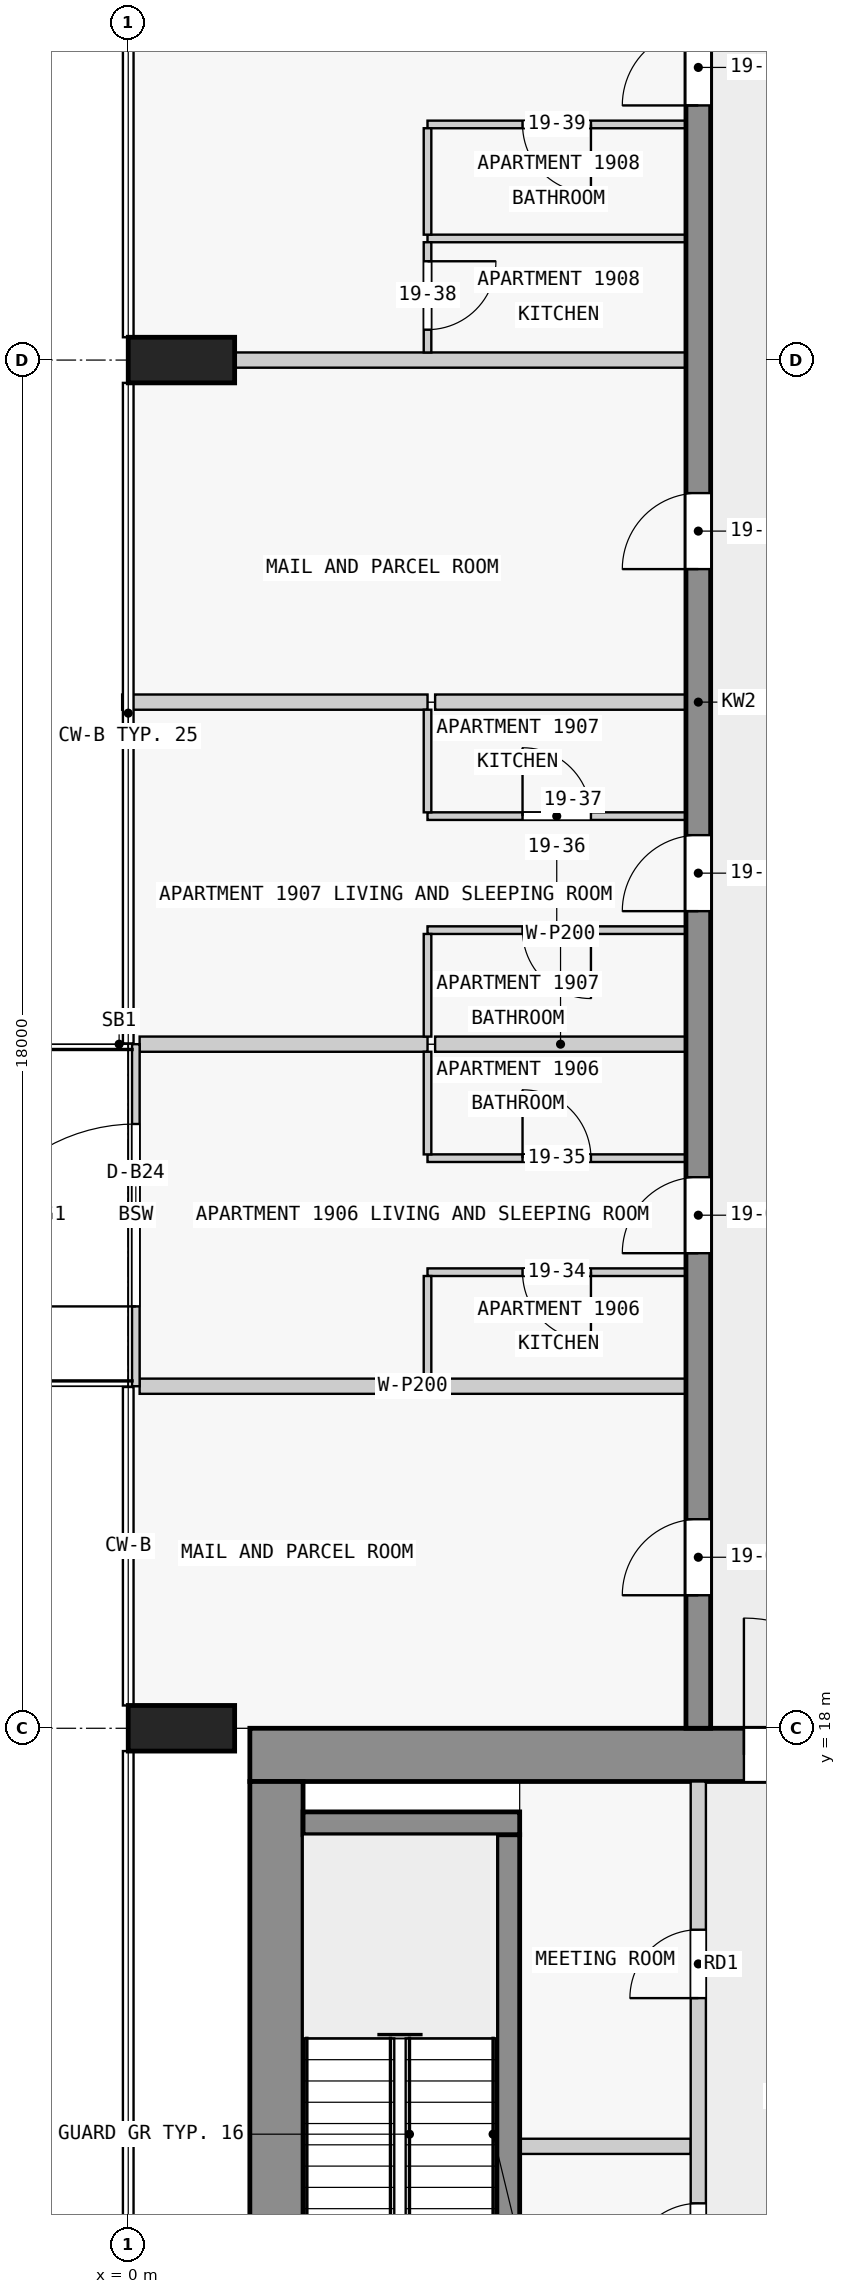
"""IFC4 building model, lengths in metres.
Left out: names, types, materials, properties, quantities, classifications, styles, units other than length and angle.
Written with IfcOpenShell. Run it as: python <this file> out.ifc"""

import sys

from ifc_helpers import new_model, si_unit, direction, frame, frame_2d, origin, origin_2d, place, context, subcontext, project, spatial, rectangle, extrude, element, fill, save


model = new_model("IFC4")
c1 = context("Model", 3, precision=1e-05, world=origin(), true_north=direction((0.0, 1.0)))
c2 = subcontext(c1, "Body", "Model", "MODEL_VIEW")
j1 = project(units=[si_unit("LENGTHUNIT", "METRE"), si_unit("PLANEANGLEUNIT", "RADIAN")], contexts=[c1])
p1 = place(None, origin())
s1 = spatial("IfcSite", under=j1, at=p1, CompositionType="ELEMENT")
p2 = place(p1, origin())
s2 = spatial("IfcBuilding", under=s1, at=p2, CompositionType="ELEMENT")
p3 = place(p2, frame((0.0, 0.0, 78.3)))
s3 = spatial("IfcBuildingStorey", under=s2, at=p3, CompositionType="ELEMENT", Elevation=78.3)
for number, where, z_axis, x_axis in (
    (1, (0.7, 36.0, 0.0), (0.0, 0.0, 1.0), (0.0, 1.0, 0.0)),
    (2, (0.7, 18.0, 0.0), (0.0, 0.0, 1.0), (0.0, 1.0, 0.0)),
):
    element("IfcColumn", number, at=place(p3, frame(where, z_axis=z_axis, x_axis=x_axis)), inside=s3, PredefinedType="COLUMN", context=c2, shape_type="SweptSolid", body=[
        extrude(rectangle(XDim=0.6, YDim=1.4, at=origin_2d()), origin(), (0.0, 0.0, 1.0), 3.5),
    ])
p4 = place(p3, frame((1.6, 17.65, 0.0), z_axis=(0.0, 0.0, 1.0), x_axis=(1.0, 0.0, 0.0)))
e3 = element("IfcWall", 3, at=p4, inside=s3, PredefinedType="SHEAR", context=c2, shape_type="SweptSolid", body=[
    extrude(rectangle(XDim=20.9, YDim=0.7, at=frame_2d((10.45, 0.0))), origin(), (0.0, 0.0, 1.0), 3.25),
])
p5 = place(p4, frame((6.5, 0.0, 0.0)))
e4 = element("IfcOpeningElement", 4, at=p5, cuts=e3, PredefinedType="OPENING", context=c2, shape_type="SweptSolid", body=[
    extrude(rectangle(XDim=1.8, YDim=2.1, at=frame_2d((0.9, 1.05))), frame((0.0, 0.36, 0.0), z_axis=(0.0, -1.0, 0.0), x_axis=(1.0, 0.0, 0.0)), (0.0, 0.0, 1.0), 0.72),
])
p6 = place(p3, frame((1.95, 2.5, 0.0), z_axis=(0.0, 0.0, 1.0), x_axis=(0.0, 1.0, 0.0)))
e5 = element("IfcWall", 5, at=p6, inside=s3, PredefinedType="SHEAR", context=c2, shape_type="SweptSolid", body=[
    extrude(rectangle(XDim=14.8, YDim=0.7, at=frame_2d((7.4, 0.0))), origin(), (0.0, 0.0, 1.0), 3.25),
])
p7 = place(p3, frame((5.0, 10.2, 0.0), z_axis=(0.0, 0.0, 1.0), x_axis=(0.0, 1.0, 0.0)))
e6 = element("IfcWall", 6, at=p7, inside=s3, PredefinedType="SHEAR", context=c2, shape_type="SweptSolid", body=[
    extrude(rectangle(XDim=6.4, YDim=0.3, at=frame_2d((3.2, 0.0))), origin(), (0.0, 0.0, 1.0), 3.25),
])
p8 = place(p3, frame((2.3, 16.75, 0.0), z_axis=(0.0, 0.0, 1.0), x_axis=(1.0, 0.0, 0.0)))
e7 = element("IfcWall", 7, at=p8, inside=s3, PredefinedType="SHEAR", context=c2, shape_type="SweptSolid", body=[
    extrude(rectangle(XDim=2.85, YDim=0.3, at=frame_2d((1.425, 0.0))), origin(), (0.0, 0.0, 1.0), 3.25),
])
p9 = place(p3, frame((7.5, 18.0, 0.0), z_axis=(0.0, 0.0, 1.0), x_axis=(0.0, 1.0, 0.0)))
e8 = element("IfcWall", 8, at=p9, inside=s3, PredefinedType="SHEAR", context=c2, shape_type="SweptSolid", body=[
    extrude(rectangle(XDim=27.0, YDim=0.325, at=frame_2d((13.5, 0.0))), origin(), (0.0, 0.0, 1.0), 3.25),
])
p10 = place(p9, frame((1.75, 0.0, 0.0)))
e9 = element("IfcOpeningElement", 9, at=p10, cuts=e8, PredefinedType="OPENING", context=c2, shape_type="SweptSolid", body=[
    extrude(rectangle(XDim=1.0, YDim=2.1, at=frame_2d((0.5, 1.05))), frame((0.0, 0.172, 0.0), z_axis=(0.0, -1.0, 0.0), x_axis=(1.0, 0.0, 0.0)), (0.0, 0.0, 1.0), 0.345),
])
p11 = place(p9, frame((6.25, 0.0, 0.0)))
e10 = element("IfcOpeningElement", 10, at=p11, cuts=e8, PredefinedType="OPENING", context=c2, shape_type="SweptSolid", body=[
    extrude(rectangle(XDim=1.0, YDim=2.1, at=frame_2d((0.5, 1.05))), frame((0.0, 0.172, 0.0), z_axis=(0.0, -1.0, 0.0), x_axis=(1.0, 0.0, 0.0)), (0.0, 0.0, 1.0), 0.345),
])
p12 = place(p9, frame((10.75, 0.0, 0.0)))
e11 = element("IfcOpeningElement", 11, at=p12, cuts=e8, PredefinedType="OPENING", context=c2, shape_type="SweptSolid", body=[
    extrude(rectangle(XDim=1.0, YDim=2.1, at=frame_2d((0.5, 1.05))), frame((0.0, 0.172, 0.0), z_axis=(0.0, -1.0, 0.0), x_axis=(1.0, 0.0, 0.0)), (0.0, 0.0, 1.0), 0.345),
])
p13 = place(p9, frame((15.25, 0.0, 0.0)))
e12 = element("IfcOpeningElement", 12, at=p13, cuts=e8, PredefinedType="OPENING", context=c2, shape_type="SweptSolid", body=[
    extrude(rectangle(XDim=1.0, YDim=2.1, at=frame_2d((0.5, 1.05))), frame((0.0, 0.172, 0.0), z_axis=(0.0, -1.0, 0.0), x_axis=(1.0, 0.0, 0.0)), (0.0, 0.0, 1.0), 0.345),
])
p14 = place(p9, frame((21.35, 0.0, 0.0)))
e13 = element("IfcOpeningElement", 13, at=p14, cuts=e8, PredefinedType="OPENING", context=c2, shape_type="SweptSolid", body=[
    extrude(rectangle(XDim=1.0, YDim=2.1, at=frame_2d((0.5, 1.05))), frame((0.0, 0.172, 0.0), z_axis=(0.0, -1.0, 0.0), x_axis=(1.0, 0.0, 0.0)), (0.0, 0.0, 1.0), 0.345),
])
p15 = place(p3, frame((0.1, 22.5, 0.0), z_axis=(0.0, 0.0, 1.0), x_axis=(0.0, 1.0, 0.0)))
e14 = element("IfcWall", 14, at=p15, inside=s3, PredefinedType="STANDARD", context=c2, shape_type="SweptSolid", body=[
    extrude(rectangle(XDim=4.5, YDim=0.1, at=frame_2d((2.25, 0.0))), origin(), (0.0, 0.0, 1.0), 3.25),
])
p16 = place(p15, frame((1.05, 0.0, 0.0)))
e15 = element("IfcOpeningElement", 15, at=p16, cuts=e14, PredefinedType="OPENING", context=c2, shape_type="SweptSolid", body=[
    extrude(rectangle(XDim=2.4, YDim=2.4, at=frame_2d((1.2, 1.2))), frame((0.0, 0.06, 0.0), z_axis=(0.0, -1.0, 0.0), x_axis=(1.0, 0.0, 0.0)), (0.0, 0.0, 1.0), 0.12),
])
p17 = place(p3, frame((7.5, 10.1, 0.0), z_axis=(0.0, 0.0, 1.0), x_axis=(0.0, 1.0, 0.0)))
e16 = element("IfcWall", 16, at=p17, inside=s3, PredefinedType="PARTITIONING", context=c2, shape_type="SweptSolid", body=[
    extrude(rectangle(XDim=7.2, YDim=0.2, at=frame_2d((3.6, 0.0))), origin(), (0.0, 0.0, 1.0), 3.25),
])
p18 = place(p17, frame((0.75, 0.0, 0.0)))
e17 = element("IfcOpeningElement", 17, at=p18, cuts=e16, PredefinedType="OPENING", context=c2, shape_type="SweptSolid", body=[
    extrude(rectangle(XDim=0.9, YDim=2.1, at=frame_2d((0.45, 1.05))), frame((0.0, 0.11, 0.0), z_axis=(0.0, -1.0, 0.0), x_axis=(1.0, 0.0, 0.0)), (0.0, 0.0, 1.0), 0.22),
])
p19 = place(p17, frame((4.35, 0.0, 0.0)))
e18 = element("IfcOpeningElement", 18, at=p19, cuts=e16, PredefinedType="OPENING", context=c2, shape_type="SweptSolid", body=[
    extrude(rectangle(XDim=0.9, YDim=2.1, at=frame_2d((0.45, 1.05))), frame((0.0, 0.11, 0.0), z_axis=(0.0, -1.0, 0.0), x_axis=(1.0, 0.0, 0.0)), (0.0, 0.0, 1.0), 0.22),
])
p20 = place(p3, frame((5.15, 12.5, 0.0), z_axis=(0.0, 0.0, 1.0), x_axis=(1.0, 0.0, 0.0)))
e19 = element("IfcWall", 19, at=p20, inside=s3, PredefinedType="PARTITIONING", context=c2, shape_type="SweptSolid", body=[
    extrude(rectangle(XDim=2.25, YDim=0.2, at=frame_2d((1.125, 0.0))), origin(), (0.0, 0.0, 1.0), 3.25),
])
p21 = place(p3, frame((7.337, 22.5, 0.0), z_axis=(0.0, 0.0, 1.0), x_axis=(-1.0, 0.0, 0.0)))
e20 = element("IfcWall", 20, at=p21, inside=s3, PredefinedType="PARTITIONING", context=c2, shape_type="SweptSolid", body=[
    extrude(rectangle(XDim=7.188, YDim=0.2, at=frame_2d((3.594, 0.0))), origin(), (0.0, 0.0, 1.0), 3.25),
])
p22 = place(p3, frame((7.337, 24.0, 0.0), z_axis=(0.0, 0.0, 1.0), x_axis=(-1.0, 0.0, 0.0)))
e21 = element("IfcWall", 21, at=p22, inside=s3, PredefinedType="PARTITIONING", context=c2, shape_type="SweptSolid", body=[
    extrude(rectangle(XDim=3.4, YDim=0.1, at=frame_2d((1.7, 0.0))), origin(), (0.0, 0.0, 1.0), 3.25),
])
p23 = place(p22, frame((1.25, 0.0, 0.0)))
e22 = element("IfcOpeningElement", 22, at=p23, cuts=e21, PredefinedType="OPENING", context=c2, shape_type="SweptSolid", body=[
    extrude(rectangle(XDim=0.9, YDim=2.1, at=frame_2d((0.45, 1.05))), frame((0.0, 0.06, 0.0), z_axis=(0.0, -1.0, 0.0), x_axis=(1.0, 0.0, 0.0)), (0.0, 0.0, 1.0), 0.12),
])
p24 = place(p3, frame((3.938, 25.5, 0.0), z_axis=(0.0, 0.0, 1.0), x_axis=(1.0, 0.0, 0.0)))
e23 = element("IfcWall", 23, at=p24, inside=s3, PredefinedType="PARTITIONING", context=c2, shape_type="SweptSolid", body=[
    extrude(rectangle(XDim=3.4, YDim=0.1, at=frame_2d((1.7, 0.0))), origin(), (0.0, 0.0, 1.0), 3.25),
])
p25 = place(p24, frame((1.25, 0.0, 0.0)))
e24 = element("IfcOpeningElement", 24, at=p25, cuts=e23, PredefinedType="OPENING", context=c2, shape_type="SweptSolid", body=[
    extrude(rectangle(XDim=0.9, YDim=2.1, at=frame_2d((0.45, 1.05))), frame((0.0, 0.06, 0.0), z_axis=(0.0, -1.0, 0.0), x_axis=(1.0, 0.0, 0.0)), (0.0, 0.0, 1.0), 0.12),
])
p26 = place(p3, frame((7.337, 27.0, 0.0), z_axis=(0.0, 0.0, 1.0), x_axis=(-1.0, 0.0, 0.0)))
e25 = element("IfcWall", 25, at=p26, inside=s3, PredefinedType="PARTITIONING", context=c2, shape_type="SweptSolid", body=[
    extrude(rectangle(XDim=3.3, YDim=0.2, at=frame_2d((1.65, 0.0))), origin(), (0.0, 0.0, 1.0), 3.25),
])
p27 = place(p3, frame((0.15, 27.0, 0.0), z_axis=(0.0, 0.0, 1.0), x_axis=(1.0, 0.0, 0.0)))
e26 = element("IfcWall", 26, at=p27, inside=s3, PredefinedType="PARTITIONING", context=c2, shape_type="SweptSolid", body=[
    extrude(rectangle(XDim=3.788, YDim=0.2, at=frame_2d((1.894, 0.0))), origin(), (0.0, 0.0, 1.0), 3.25),
])
p28 = place(p3, frame((7.337, 28.5, 0.0), z_axis=(0.0, 0.0, 1.0), x_axis=(-1.0, 0.0, 0.0)))
e27 = element("IfcWall", 27, at=p28, inside=s3, PredefinedType="PARTITIONING", context=c2, shape_type="SweptSolid", body=[
    extrude(rectangle(XDim=3.4, YDim=0.1, at=frame_2d((1.7, 0.0))), origin(), (0.0, 0.0, 1.0), 3.25),
])
p29 = place(p28, frame((1.25, 0.0, 0.0)))
e28 = element("IfcOpeningElement", 28, at=p29, cuts=e27, PredefinedType="OPENING", context=c2, shape_type="SweptSolid", body=[
    extrude(rectangle(XDim=0.9, YDim=2.1, at=frame_2d((0.45, 1.05))), frame((0.0, 0.06, 0.0), z_axis=(0.0, -1.0, 0.0), x_axis=(1.0, 0.0, 0.0)), (0.0, 0.0, 1.0), 0.12),
])
p30 = place(p3, frame((3.938, 30.0, 0.0), z_axis=(0.0, 0.0, 1.0), x_axis=(1.0, 0.0, 0.0)))
e29 = element("IfcWall", 29, at=p30, inside=s3, PredefinedType="PARTITIONING", context=c2, shape_type="SweptSolid", body=[
    extrude(rectangle(XDim=3.4, YDim=0.1, at=frame_2d((1.7, 0.0))), origin(), (0.0, 0.0, 1.0), 3.25),
])
p31 = place(p30, frame((1.25, 0.0, 0.0)))
e30 = element("IfcOpeningElement", 30, at=p31, cuts=e29, PredefinedType="OPENING", context=c2, shape_type="SweptSolid", body=[
    extrude(rectangle(XDim=0.9, YDim=2.1, at=frame_2d((0.45, 1.05))), frame((0.0, 0.06, 0.0), z_axis=(0.0, -1.0, 0.0), x_axis=(1.0, 0.0, 0.0)), (0.0, 0.0, 1.0), 0.12),
])
p32 = place(p3, frame((7.337, 31.5, 0.0), z_axis=(0.0, 0.0, 1.0), x_axis=(-1.0, 0.0, 0.0)))
e31 = element("IfcWall", 31, at=p32, inside=s3, PredefinedType="PARTITIONING", context=c2, shape_type="SweptSolid", body=[
    extrude(rectangle(XDim=3.3, YDim=0.2, at=frame_2d((1.65, 0.0))), origin(), (0.0, 0.0, 1.0), 3.25),
])
p33 = place(p3, frame((-0.08, 31.5, 0.0), z_axis=(0.0, 0.0, 1.0), x_axis=(1.0, 0.0, 0.0)))
e32 = element("IfcWall", 32, at=p33, inside=s3, PredefinedType="PARTITIONING", context=c2, shape_type="SweptSolid", body=[
    extrude(rectangle(XDim=4.018, YDim=0.2, at=frame_2d((2.009, 0.0))), origin(), (0.0, 0.0, 1.0), 3.25),
])
p34 = place(p3, frame((7.337, 36.0, 0.0), z_axis=(0.0, 0.0, 1.0), x_axis=(-1.0, 0.0, 0.0)))
e33 = element("IfcWall", 33, at=p34, inside=s3, PredefinedType="PARTITIONING", context=c2, shape_type="SweptSolid", body=[
    extrude(rectangle(XDim=5.938, YDim=0.2, at=frame_2d((2.969, 0.0))), origin(), (0.0, 0.0, 1.0), 3.25),
])
p35 = place(p3, frame((7.337, 37.6, 0.0), z_axis=(0.0, 0.0, 1.0), x_axis=(-1.0, 0.0, 0.0)))
e34 = element("IfcWall", 34, at=p35, inside=s3, PredefinedType="PARTITIONING", context=c2, shape_type="SweptSolid", body=[
    extrude(rectangle(XDim=3.4, YDim=0.1, at=frame_2d((1.7, 0.0))), origin(), (0.0, 0.0, 1.0), 3.25),
])
p36 = place(p3, frame((7.337, 39.1, 0.0), z_axis=(0.0, 0.0, 1.0), x_axis=(-1.0, 0.0, 0.0)))
e35 = element("IfcWall", 35, at=p36, inside=s3, PredefinedType="PARTITIONING", context=c2, shape_type="SweptSolid", body=[
    extrude(rectangle(XDim=3.4, YDim=0.1, at=frame_2d((1.7, 0.0))), origin(), (0.0, 0.0, 1.0), 3.25),
])
p37 = place(p36, frame((1.25, 0.0, 0.0)))
e36 = element("IfcOpeningElement", 36, at=p37, cuts=e35, PredefinedType="OPENING", context=c2, shape_type="SweptSolid", body=[
    extrude(rectangle(XDim=0.9, YDim=2.1, at=frame_2d((0.45, 1.05))), frame((0.0, 0.06, 0.0), z_axis=(0.0, -1.0, 0.0), x_axis=(1.0, 0.0, 0.0)), (0.0, 0.0, 1.0), 0.12),
])
for number, where, z_axis, x_axis in (
    (37, (3.938, 23.95, 0.0), (0.0, 0.0, 1.0), (0.0, -1.0, 0.0)),
    (38, (3.938, 26.9, 0.0), (0.0, 0.0, 1.0), (0.0, -1.0, 0.0)),
    (39, (3.938, 28.45, 0.0), (0.0, 0.0, 1.0), (0.0, -1.0, 0.0)),
    (40, (3.938, 31.4, 0.0), (0.0, 0.0, 1.0), (0.0, -1.0, 0.0)),
):
    element("IfcWall", number, at=place(p3, frame(where, z_axis=z_axis, x_axis=x_axis)), inside=s3, PredefinedType="PARTITIONING", context=c2, shape_type="SweptSolid", body=[
        extrude(rectangle(XDim=1.35, YDim=0.1, at=frame_2d((0.675, 0.0))), origin(), (0.0, 0.0, 1.0), 3.25),
    ])
p38 = place(p3, frame((3.938, 37.55, 0.0), z_axis=(0.0, 0.0, 1.0), x_axis=(0.0, -1.0, 0.0)))
e41 = element("IfcWall", 41, at=p38, inside=s3, PredefinedType="PARTITIONING", context=c2, shape_type="SweptSolid", body=[
    extrude(rectangle(XDim=1.45, YDim=0.1, at=frame_2d((0.725, 0.0))), origin(), (0.0, 0.0, 1.0), 3.25),
])
p39 = place(p38, frame((0.25, 0.0, 0.0)))
e42 = element("IfcOpeningElement", 42, at=p39, cuts=e41, PredefinedType="OPENING", context=c2, shape_type="SweptSolid", body=[
    extrude(rectangle(XDim=0.9, YDim=2.1, at=frame_2d((0.45, 1.05))), frame((0.0, 0.06, 0.0), z_axis=(0.0, -1.0, 0.0), x_axis=(1.0, 0.0, 0.0)), (0.0, 0.0, 1.0), 0.12),
])
p40 = place(p3, frame((3.938, 39.05, 0.0), z_axis=(0.0, 0.0, 1.0), x_axis=(0.0, -1.0, 0.0)))
e43 = element("IfcWall", 43, at=p40, inside=s3, PredefinedType="PARTITIONING", context=c2, shape_type="SweptSolid", body=[
    extrude(rectangle(XDim=1.4, YDim=0.1, at=frame_2d((0.7, 0.0))), origin(), (0.0, 0.0, 1.0), 3.25),
])
p41 = place(p16, origin())
e44 = element("IfcDoor", 44, at=p41, inside=s3, OperationType="SINGLE_SWING_LEFT", PredefinedType="DOOR", context=c2, shape_type="SweptSolid", body=[
    extrude(rectangle(XDim=2.4, YDim=2.4, at=frame_2d((1.2, 1.2))), frame((0.0, 0.025, 0.0), z_axis=(0.0, -1.0, 0.0), x_axis=(1.0, 0.0, 0.0)), (0.0, 0.0, 1.0), 0.05),
])
fill(e15, e44)
p42 = place(p5, origin())
e45 = element("IfcDoor", 45, at=p42, inside=s3, OperationType="DOUBLE_DOOR_SINGLE_SWING", PredefinedType="DOOR", context=c2, shape_type="SweptSolid", body=[
    extrude(rectangle(XDim=1.8, YDim=2.1, at=frame_2d((0.9, 1.05))), frame((0.0, 0.025, 0.0), z_axis=(0.0, -1.0, 0.0), x_axis=(1.0, 0.0, 0.0)), (0.0, 0.0, 1.0), 0.05),
])
fill(e4, e45)
p43 = place(p18, origin())
e46 = element("IfcDoor", 46, at=p43, inside=s3, OperationType="SINGLE_SWING_RIGHT", PredefinedType="DOOR", context=c2, shape_type="SweptSolid", body=[
    extrude(rectangle(XDim=0.9, YDim=2.1, at=frame_2d((0.45, 1.05))), frame((0.0, 0.025, 0.0), z_axis=(0.0, -1.0, 0.0), x_axis=(1.0, 0.0, 0.0)), (0.0, 0.0, 1.0), 0.05),
])
fill(e17, e46)
p44 = place(p19, origin())
e47 = element("IfcDoor", 47, at=p44, inside=s3, OperationType="SINGLE_SWING_RIGHT", PredefinedType="DOOR", context=c2, shape_type="SweptSolid", body=[
    extrude(rectangle(XDim=0.9, YDim=2.1, at=frame_2d((0.45, 1.05))), frame((0.0, 0.025, 0.0), z_axis=(0.0, -1.0, 0.0), x_axis=(1.0, 0.0, 0.0)), (0.0, 0.0, 1.0), 0.05),
])
fill(e18, e47)
p45 = place(p10, origin())
e48 = element("IfcDoor", 48, at=p45, inside=s3, OperationType="SINGLE_SWING_LEFT", PredefinedType="DOOR", context=c2, shape_type="SweptSolid", body=[
    extrude(rectangle(XDim=1.0, YDim=2.1, at=frame_2d((0.5, 1.05))), frame((0.0, 0.025, 0.0), z_axis=(0.0, -1.0, 0.0), x_axis=(1.0, 0.0, 0.0)), (0.0, 0.0, 1.0), 0.05),
])
fill(e9, e48)
p46 = place(p11, origin())
e49 = element("IfcDoor", 49, at=p46, inside=s3, OperationType="SINGLE_SWING_LEFT", PredefinedType="DOOR", context=c2, shape_type="SweptSolid", body=[
    extrude(rectangle(XDim=1.0, YDim=2.1, at=frame_2d((0.5, 1.05))), frame((0.0, 0.025, 0.0), z_axis=(0.0, -1.0, 0.0), x_axis=(1.0, 0.0, 0.0)), (0.0, 0.0, 1.0), 0.05),
])
fill(e10, e49)
p47 = place(p12, origin())
e50 = element("IfcDoor", 50, at=p47, inside=s3, OperationType="SINGLE_SWING_LEFT", PredefinedType="DOOR", context=c2, shape_type="SweptSolid", body=[
    extrude(rectangle(XDim=1.0, YDim=2.1, at=frame_2d((0.5, 1.05))), frame((0.0, 0.025, 0.0), z_axis=(0.0, -1.0, 0.0), x_axis=(1.0, 0.0, 0.0)), (0.0, 0.0, 1.0), 0.05),
])
fill(e11, e50)
p48 = place(p13, origin())
e51 = element("IfcDoor", 51, at=p48, inside=s3, OperationType="SINGLE_SWING_RIGHT", PredefinedType="DOOR", context=c2, shape_type="SweptSolid", body=[
    extrude(rectangle(XDim=1.0, YDim=2.1, at=frame_2d((0.5, 1.05))), frame((0.0, 0.025, 0.0), z_axis=(0.0, -1.0, 0.0), x_axis=(1.0, 0.0, 0.0)), (0.0, 0.0, 1.0), 0.05),
])
fill(e12, e51)
p49 = place(p14, origin())
e52 = element("IfcDoor", 52, at=p49, inside=s3, OperationType="SINGLE_SWING_RIGHT", PredefinedType="DOOR", context=c2, shape_type="SweptSolid", body=[
    extrude(rectangle(XDim=1.0, YDim=2.1, at=frame_2d((0.5, 1.05))), frame((0.0, 0.025, 0.0), z_axis=(0.0, -1.0, 0.0), x_axis=(1.0, 0.0, 0.0)), (0.0, 0.0, 1.0), 0.05),
])
fill(e13, e52)
p50 = place(p23, origin())
e53 = element("IfcDoor", 53, at=p50, inside=s3, OperationType="SINGLE_SWING_LEFT", PredefinedType="DOOR", context=c2, shape_type="SweptSolid", body=[
    extrude(rectangle(XDim=0.9, YDim=2.1, at=frame_2d((0.45, 1.05))), frame((0.0, 0.025, 0.0), z_axis=(0.0, -1.0, 0.0), x_axis=(1.0, 0.0, 0.0)), (0.0, 0.0, 1.0), 0.05),
])
fill(e22, e53)
p51 = place(p25, origin())
e54 = element("IfcDoor", 54, at=p51, inside=s3, OperationType="SINGLE_SWING_LEFT", PredefinedType="DOOR", context=c2, shape_type="SweptSolid", body=[
    extrude(rectangle(XDim=0.9, YDim=2.1, at=frame_2d((0.45, 1.05))), frame((0.0, 0.025, 0.0), z_axis=(0.0, -1.0, 0.0), x_axis=(1.0, 0.0, 0.0)), (0.0, 0.0, 1.0), 0.05),
])
fill(e24, e54)
p52 = place(p29, origin())
e55 = element("IfcDoor", 55, at=p52, inside=s3, OperationType="SINGLE_SWING_LEFT", PredefinedType="DOOR", context=c2, shape_type="SweptSolid", body=[
    extrude(rectangle(XDim=0.9, YDim=2.1, at=frame_2d((0.45, 1.05))), frame((0.0, 0.025, 0.0), z_axis=(0.0, -1.0, 0.0), x_axis=(1.0, 0.0, 0.0)), (0.0, 0.0, 1.0), 0.05),
])
fill(e28, e55)
p53 = place(p31, origin())
e56 = element("IfcDoor", 56, at=p53, inside=s3, OperationType="SINGLE_SWING_LEFT", PredefinedType="DOOR", context=c2, shape_type="SweptSolid", body=[
    extrude(rectangle(XDim=0.9, YDim=2.1, at=frame_2d((0.45, 1.05))), frame((0.0, 0.025, 0.0), z_axis=(0.0, -1.0, 0.0), x_axis=(1.0, 0.0, 0.0)), (0.0, 0.0, 1.0), 0.05),
])
fill(e30, e56)
p54 = place(p39, origin())
e57 = element("IfcDoor", 57, at=p54, inside=s3, OperationType="SINGLE_SWING_LEFT", PredefinedType="DOOR", context=c2, shape_type="SweptSolid", body=[
    extrude(rectangle(XDim=0.9, YDim=2.1, at=frame_2d((0.45, 1.05))), frame((0.0, 0.025, 0.0), z_axis=(0.0, -1.0, 0.0), x_axis=(1.0, 0.0, 0.0)), (0.0, 0.0, 1.0), 0.05),
])
fill(e42, e57)
p55 = place(p37, origin())
e58 = element("IfcDoor", 58, at=p55, inside=s3, OperationType="SINGLE_SWING_LEFT", PredefinedType="DOOR", context=c2, shape_type="SweptSolid", body=[
    extrude(rectangle(XDim=0.9, YDim=2.1, at=frame_2d((0.45, 1.05))), frame((0.0, 0.025, 0.0), z_axis=(0.0, -1.0, 0.0), x_axis=(1.0, 0.0, 0.0)), (0.0, 0.0, 1.0), 0.05),
])
fill(e36, e58)
save(model, sys.argv[1])
